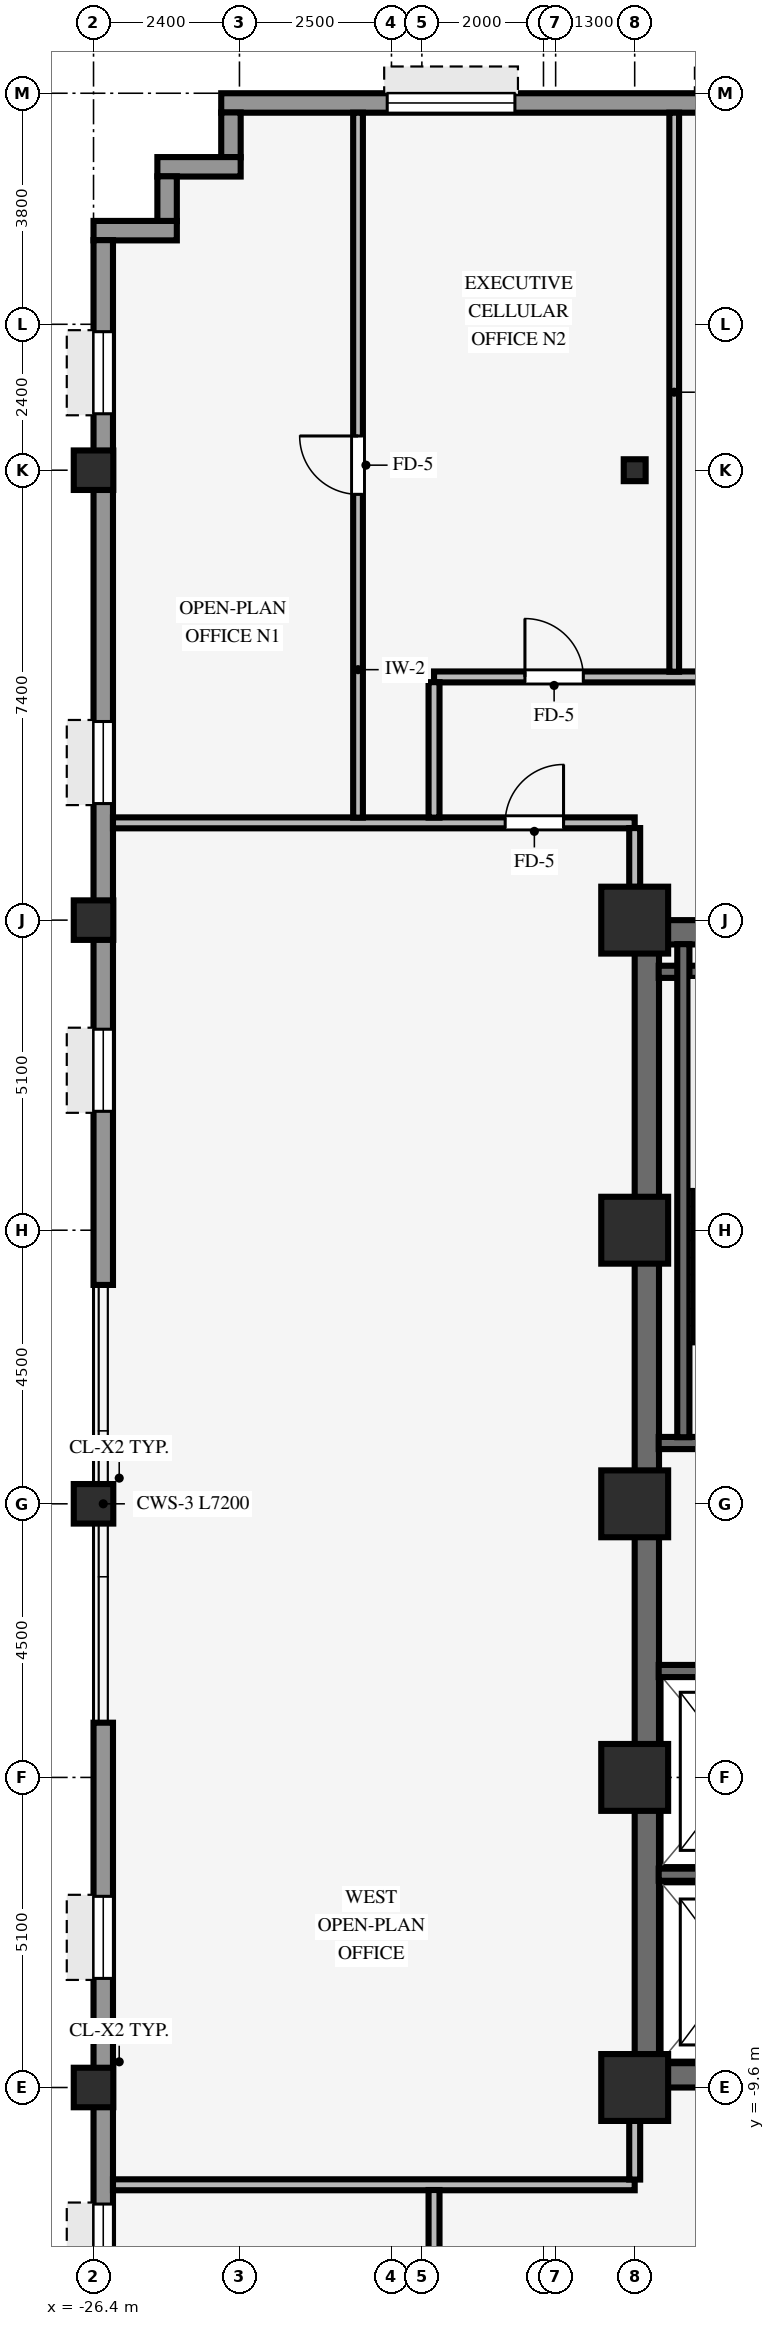
"""IFC4 building model, lengths in metres.
Left out: names, types, materials, properties, quantities, classifications, styles, units other than length and angle.
Written with IfcOpenShell. Run it as: python <this file> out.ifc"""

import sys

from ifc_helpers import new_model, si_unit, direction, frame, frame_2d, origin, origin_2d, place, context, subcontext, project, spatial, rectangle, hollow_rectangle, i_section, extrude, source, transform, mapped, element, fill, save


model = new_model("IFC4")
c1 = context("Model", 3, precision=1e-05, world=origin(), true_north=direction((0.0, 1.0)))
c2 = subcontext(c1, "Body", "Model", "MODEL_VIEW")
j1 = project(units=[si_unit("LENGTHUNIT", "METRE"), si_unit("PLANEANGLEUNIT", "RADIAN")], contexts=[c1])
p1 = place(None, origin())
s1 = spatial("IfcSite", under=j1, at=p1, CompositionType="ELEMENT")
p2 = place(p1, origin())
s2 = spatial("IfcBuilding", under=s1, at=p2, CompositionType="ELEMENT")
p3 = place(p2, frame((0.0, 0.0, 116.55)))
s3 = spatial("IfcBuildingStorey", under=s2, at=p3, CompositionType="ELEMENT", Elevation=116.55)
for number, where, z_axis, x_axis in (
    (1, (-17.5, -9.4, 0.0), (0.0, 0.0, 1.0), (1.0, 0.0, 0.0)),
    (2, (-17.5, 9.4, 0.0), (0.0, 0.0, 1.0), (1.0, 0.0, 0.0)),
):
    element("IfcWall", number, at=place(p3, frame(where, z_axis=z_axis, x_axis=x_axis)), inside=s3, PredefinedType="SHEAR", context=c2, shape_type="SweptSolid", body=[
        extrude(rectangle(XDim=8.5, YDim=0.4, at=frame_2d((4.25, 0.0))), origin(), (0.0, 0.0, 1.0), 3.37),
    ])
p4 = place(p3, frame((-17.3, -9.205, 0.0), z_axis=(0.0, 0.0, 1.0), x_axis=(0.0, 1.0, 0.0)))
e3 = element("IfcWall", 3, at=p4, inside=s3, PredefinedType="SHEAR", context=c2, shape_type="SweptSolid", body=[
    extrude(rectangle(XDim=18.41, YDim=0.4, at=frame_2d((9.205, 0.0))), origin(), (0.0, 0.0, 1.0), 3.37),
])
for number, where, z_axis, x_axis in (
    (4, (-17.5, -9.6, 0.0), (0.0, 0.0, 1.0), (1.0, 0.0, 0.0)),
    (5, (-17.5, -4.5, 0.0), (0.0, 0.0, 1.0), (1.0, 0.0, 0.0)),
    (6, (-17.5, 4.5, 0.0), (0.0, 0.0, 1.0), (1.0, 0.0, 0.0)),
    (7, (-17.5, 9.6, 0.0), (0.0, 0.0, 1.0), (1.0, 0.0, 0.0)),
    (8, (-17.5, 0.0, 0.0), (0.0, 0.0, 1.0), (1.0, 0.0, 0.0)),
):
    element("IfcColumn", number, at=place(p3, frame(where, z_axis=z_axis, x_axis=x_axis)), inside=s3, PredefinedType="COLUMN", context=c2, shape_type="SweptSolid", body=[
        extrude(rectangle(XDim=1.1, YDim=1.1, at=origin_2d()), origin(), (0.0, 0.0, 1.0), 3.37),
    ])
for number, where, z_axis, x_axis in (
    (9, (-26.4, -9.6, -0.4), (0.0, 0.0, 1.0), (1.0, 0.0, 0.0)),
    (10, (-26.4, 0.0, -0.4), (0.0, 0.0, 1.0), (1.0, 0.0, 0.0)),
    (11, (-26.4, 9.6, -0.4), (0.0, 0.0, 1.0), (1.0, 0.0, 0.0)),
    (12, (-26.4, 17.0, -0.4), (0.0, 0.0, 1.0), (1.0, 0.0, 0.0)),
):
    element("IfcColumn", number, at=place(p3, frame(where, z_axis=z_axis, x_axis=x_axis)), inside=s3, PredefinedType="COLUMN", context=c2, shape_type="SweptSolid", body=[
        extrude(hollow_rectangle(XDim=0.65, YDim=0.65, WallThickness=0.04, InnerFilletRadius=0.04, OuterFilletRadius=0.08, at=origin_2d()), origin(), (0.0, 0.0, 1.0), 3.77),
    ])
p5 = place(p3, frame((-17.5, 17.0, 0.0), z_axis=(0.0, 0.0, 1.0), x_axis=(1.0, 0.0, 0.0)))
e13 = element("IfcColumn", 13, at=p5, inside=s3, PredefinedType="COLUMN", context=c2, shape_type="SweptSolid", body=[
    extrude(i_section(OverallWidth=0.36, OverallDepth=0.36, WebThickness=0.021, FlangeThickness=0.021, FilletRadius=0.018, at=origin_2d()), origin(), (0.0, 0.0, 1.0), 3.37),
])
p6 = place(p3, frame((-24.3, 23.04, 0.0), z_axis=(0.0, 0.0, 1.0), x_axis=(1.0, 0.0, 0.0)))
e14 = element("IfcWall", 14, at=p6, inside=s3, PredefinedType="STANDARD", context=c2, shape_type="SweptSolid", body=[
    extrude(rectangle(XDim=48.6, YDim=0.32, at=frame_2d((24.3, 0.0))), origin(), (0.0, 0.0, 1.0), 2.705),
])
p7 = place(p6, frame((28.5, 0.0, 0.0)))
e15 = element("IfcOpeningElement", 15, at=p7, cuts=e14, PredefinedType="OPENING", context=c2, shape_type="SweptSolid", body=[
    extrude(rectangle(XDim=1.05, YDim=2.1, at=frame_2d((0.525, 1.05))), frame((0.0, 0.17, 0.0), z_axis=(0.0, -1.0, 0.0), x_axis=(1.0, 0.0, 0.0)), (0.0, 0.0, 1.0), 0.34),
])
p8 = place(p6, frame((2.73, 0.0, 0.8)))
e16 = element("IfcOpeningElement", 16, at=p8, cuts=e14, PredefinedType="OPENING", context=c2, shape_type="SweptSolid", body=[
    extrude(rectangle(XDim=2.1, YDim=1.56, at=frame_2d((1.05, 0.78))), frame((0.0, 0.17, 0.0), z_axis=(0.0, -1.0, 0.0), x_axis=(1.0, 0.0, 0.0)), (0.0, 0.0, 1.0), 0.34),
])
p9 = place(p6, frame((7.84, 0.0, 0.8)))
e17 = element("IfcOpeningElement", 17, at=p9, cuts=e14, PredefinedType="OPENING", context=c2, shape_type="SweptSolid", body=[
    extrude(rectangle(XDim=2.1, YDim=1.56, at=frame_2d((1.05, 0.78))), frame((0.0, 0.17, 0.0), z_axis=(0.0, -1.0, 0.0), x_axis=(1.0, 0.0, 0.0)), (0.0, 0.0, 1.0), 0.34),
])
p10 = place(p6, frame((20.92, 0.0, 0.8)))
e18 = element("IfcOpeningElement", 18, at=p10, cuts=e14, PredefinedType="OPENING", context=c2, shape_type="SweptSolid", body=[
    extrude(rectangle(XDim=2.1, YDim=1.56, at=frame_2d((1.05, 0.78))), frame((0.0, 0.17, 0.0), z_axis=(0.0, -1.0, 0.0), x_axis=(1.0, 0.0, 0.0)), (0.0, 0.0, 1.0), 0.34),
])
p11 = place(p6, frame((25.58, 0.0, 0.8)))
e19 = element("IfcOpeningElement", 19, at=p11, cuts=e14, PredefinedType="OPENING", context=c2, shape_type="SweptSolid", body=[
    extrude(rectangle(XDim=2.1, YDim=1.56, at=frame_2d((1.05, 0.78))), frame((0.0, 0.17, 0.0), z_axis=(0.0, -1.0, 0.0), x_axis=(1.0, 0.0, 0.0)), (0.0, 0.0, 1.0), 0.34),
])
p12 = place(p6, frame((30.24, 0.0, 0.8)))
e20 = element("IfcOpeningElement", 20, at=p12, cuts=e14, PredefinedType="OPENING", context=c2, shape_type="SweptSolid", body=[
    extrude(rectangle(XDim=2.1, YDim=1.56, at=frame_2d((1.05, 0.78))), frame((0.0, 0.17, 0.0), z_axis=(0.0, -1.0, 0.0), x_axis=(1.0, 0.0, 0.0)), (0.0, 0.0, 1.0), 0.34),
])
p13 = place(p6, frame((34.9, 0.0, 0.8)))
e21 = element("IfcOpeningElement", 21, at=p13, cuts=e14, PredefinedType="OPENING", context=c2, shape_type="SweptSolid", body=[
    extrude(rectangle(XDim=2.1, YDim=1.56, at=frame_2d((1.05, 0.78))), frame((0.0, 0.17, 0.0), z_axis=(0.0, -1.0, 0.0), x_axis=(1.0, 0.0, 0.0)), (0.0, 0.0, 1.0), 0.34),
])
p14 = place(p6, frame((39.56, 0.0, 0.8)))
e22 = element("IfcOpeningElement", 22, at=p14, cuts=e14, PredefinedType="OPENING", context=c2, shape_type="SweptSolid", body=[
    extrude(rectangle(XDim=2.1, YDim=1.56, at=frame_2d((1.05, 0.78))), frame((0.0, 0.17, 0.0), z_axis=(0.0, -1.0, 0.0), x_axis=(1.0, 0.0, 0.0)), (0.0, 0.0, 1.0), 0.34),
])
p15 = place(p6, frame((44.22, 0.0, 0.8)))
e23 = element("IfcOpeningElement", 23, at=p15, cuts=e14, PredefinedType="OPENING", context=c2, shape_type="SweptSolid", body=[
    extrude(rectangle(XDim=2.1, YDim=1.56, at=frame_2d((1.05, 0.78))), frame((0.0, 0.17, 0.0), z_axis=(0.0, -1.0, 0.0), x_axis=(1.0, 0.0, 0.0)), (0.0, 0.0, 1.0), 0.34),
])
p16 = place(p3, frame((-24.14, 22.146, 0.0), z_axis=(0.0, 0.0, 1.0), x_axis=(0.0, 1.0, 0.0)))
e24 = element("IfcWall", 24, at=p16, inside=s3, PredefinedType="STANDARD", context=c2, shape_type="SweptSolid", body=[
    extrude(rectangle(XDim=0.738, YDim=0.32, at=frame_2d((0.369, 0.0))), origin(), (0.0, 0.0, 1.0), 3.36),
])
p17 = place(p3, frame((-25.35, 21.99, 0.0), z_axis=(0.0, 0.0, 1.0), x_axis=(1.0, 0.0, 0.0)))
e25 = element("IfcWall", 25, at=p17, inside=s3, PredefinedType="STANDARD", context=c2, shape_type="SweptSolid", body=[
    extrude(rectangle(XDim=1.37, YDim=0.32, at=frame_2d((0.685, 0.0))), origin(), (0.0, 0.0, 1.0), 3.36),
])
p18 = place(p3, frame((-25.19, 21.096, 0.0), z_axis=(0.0, 0.0, 1.0), x_axis=(0.0, 1.0, 0.0)))
e26 = element("IfcWall", 26, at=p18, inside=s3, PredefinedType="STANDARD", context=c2, shape_type="SweptSolid", body=[
    extrude(rectangle(XDim=0.738, YDim=0.32, at=frame_2d((0.369, 0.0))), origin(), (0.0, 0.0, 1.0), 3.36),
])
p19 = place(p3, frame((-26.4, 20.94, 0.0), z_axis=(0.0, 0.0, 1.0), x_axis=(1.0, 0.0, 0.0)))
e27 = element("IfcWall", 27, at=p19, inside=s3, PredefinedType="STANDARD", context=c2, shape_type="SweptSolid", body=[
    extrude(rectangle(XDim=1.37, YDim=0.32, at=frame_2d((0.685, 0.0))), origin(), (0.0, 0.0, 1.0), 3.36),
])
p20 = place(p3, frame((-26.24, -20.784, 0.0), z_axis=(0.0, 0.0, 1.0), x_axis=(0.0, 1.0, 0.0)))
e28 = element("IfcWall", 28, at=p20, inside=s3, PredefinedType="STANDARD", context=c2, shape_type="SweptSolid", body=[
    extrude(rectangle(XDim=17.184, YDim=0.32, at=frame_2d((8.592, 0.0))), origin(), (0.0, 0.0, 1.0), 2.705),
])
p21 = place(p20, frame((1.506, 0.0, 0.8)))
e29 = element("IfcOpeningElement", 29, at=p21, cuts=e28, PredefinedType="OPENING", context=c2, shape_type="SweptSolid", body=[
    extrude(rectangle(XDim=1.35, YDim=1.56, at=frame_2d((0.675, 0.78))), frame((0.0, 0.17, 0.0), z_axis=(0.0, -1.0, 0.0), x_axis=(1.0, 0.0, 0.0)), (0.0, 0.0, 1.0), 0.34),
])
p22 = place(p20, frame((7.917, 0.0, 0.8)))
e30 = element("IfcOpeningElement", 30, at=p22, cuts=e28, PredefinedType="OPENING", context=c2, shape_type="SweptSolid", body=[
    extrude(rectangle(XDim=1.35, YDim=1.56, at=frame_2d((0.675, 0.78))), frame((0.0, 0.17, 0.0), z_axis=(0.0, -1.0, 0.0), x_axis=(1.0, 0.0, 0.0)), (0.0, 0.0, 1.0), 0.34),
])
p23 = place(p20, frame((12.978, 0.0, 0.8)))
e31 = element("IfcOpeningElement", 31, at=p23, cuts=e28, PredefinedType="OPENING", context=c2, shape_type="SweptSolid", body=[
    extrude(rectangle(XDim=1.35, YDim=1.56, at=frame_2d((0.675, 0.78))), frame((0.0, 0.17, 0.0), z_axis=(0.0, -1.0, 0.0), x_axis=(1.0, 0.0, 0.0)), (0.0, 0.0, 1.0), 0.34),
])
p24 = place(p3, frame((-26.24, 3.6, 0.0), z_axis=(0.0, 0.0, 1.0), x_axis=(0.0, 1.0, 0.0)))
e32 = element("IfcWall", 32, at=p24, inside=s3, PredefinedType="STANDARD", context=c2, shape_type="SweptSolid", body=[
    extrude(rectangle(XDim=17.184, YDim=0.32, at=frame_2d((8.592, 0.0))), origin(), (0.0, 0.0, 1.0), 2.705),
])
p25 = place(p24, frame((2.856, 0.0, 0.8)))
e33 = element("IfcOpeningElement", 33, at=p25, cuts=e32, PredefinedType="OPENING", context=c2, shape_type="SweptSolid", body=[
    extrude(rectangle(XDim=1.35, YDim=1.56, at=frame_2d((0.675, 0.78))), frame((0.0, 0.17, 0.0), z_axis=(0.0, -1.0, 0.0), x_axis=(1.0, 0.0, 0.0)), (0.0, 0.0, 1.0), 0.34),
])
p26 = place(p24, frame((7.917, 0.0, 0.8)))
e34 = element("IfcOpeningElement", 34, at=p26, cuts=e32, PredefinedType="OPENING", context=c2, shape_type="SweptSolid", body=[
    extrude(rectangle(XDim=1.35, YDim=1.56, at=frame_2d((0.675, 0.78))), frame((0.0, 0.17, 0.0), z_axis=(0.0, -1.0, 0.0), x_axis=(1.0, 0.0, 0.0)), (0.0, 0.0, 1.0), 0.34),
])
p27 = place(p24, frame((14.328, 0.0, 0.8)))
e35 = element("IfcOpeningElement", 35, at=p27, cuts=e32, PredefinedType="OPENING", context=c2, shape_type="SweptSolid", body=[
    extrude(rectangle(XDim=1.35, YDim=1.56, at=frame_2d((0.675, 0.78))), frame((0.0, 0.17, 0.0), z_axis=(0.0, -1.0, 0.0), x_axis=(1.0, 0.0, 0.0)), (0.0, 0.0, 1.0), 0.34),
])
for number, where, z_axis, x_axis in (
    (36, (-17.105, 1.0, 0.0), (0.0, 0.0, 1.0), (1.0, 0.0, 0.0)),
    (37, (-17.105, 8.75, 0.0), (0.0, 0.0, 1.0), (1.0, 0.0, 0.0)),
):
    element("IfcWall", number, at=place(p3, frame(where, z_axis=z_axis, x_axis=x_axis)), inside=s3, PredefinedType="SHEAR", context=c2, shape_type="SweptSolid", body=[
        extrude(rectangle(XDim=3.57, YDim=0.2, at=frame_2d((1.785, 0.0))), origin(), (0.0, 0.0, 1.0), 3.37),
    ])
p28 = place(p3, frame((-16.7, 1.095, 0.0), z_axis=(0.0, 0.0, 1.0), x_axis=(0.0, 1.0, 0.0)))
e38 = element("IfcWall", 38, at=p28, inside=s3, PredefinedType="SHEAR", context=c2, shape_type="SweptSolid", body=[
    extrude(rectangle(XDim=8.11, YDim=0.2, at=frame_2d((4.055, 0.0))), origin(), (0.0, 0.0, 1.0), 3.37),
])
p29 = place(p3, frame((-17.105, -6.1, 0.0), z_axis=(0.0, 0.0, 1.0), x_axis=(1.0, 0.0, 0.0)))
e39 = element("IfcWall", 39, at=p29, inside=s3, PredefinedType="SHEAR", context=c2, shape_type="SweptSolid", body=[
    extrude(rectangle(XDim=2.855, YDim=0.2, at=frame_2d((1.427, 0.0))), origin(), (0.0, 0.0, 1.0), 3.37),
])
p30 = place(p3, frame((-17.105, -2.75, 0.0), z_axis=(0.0, 0.0, 1.0), x_axis=(1.0, 0.0, 0.0)))
e40 = element("IfcWall", 40, at=p30, inside=s3, PredefinedType="SHEAR", context=c2, shape_type="SweptSolid", body=[
    extrude(rectangle(XDim=2.66, YDim=0.2, at=frame_2d((1.33, 0.0))), origin(), (0.0, 0.0, 1.0), 3.37),
])
p31 = place(p3, frame((-26.08, -11.2, 0.0), z_axis=(0.0, 0.0, 1.0), x_axis=(1.0, 0.0, 0.0)))
e41 = element("IfcWall", 41, at=p31, inside=s3, PredefinedType="PARTITIONING", context=c2, shape_type="SweptSolid", body=[
    extrude(rectangle(XDim=8.58, YDim=0.18, at=frame_2d((4.29, 0.0))), origin(), (0.0, 0.0, 1.0), 3.36),
])
p32 = place(p3, frame((-26.08, 11.2, 0.0), z_axis=(0.0, 0.0, 1.0), x_axis=(1.0, 0.0, 0.0)))
e42 = element("IfcWall", 42, at=p32, inside=s3, PredefinedType="PARTITIONING", context=c2, shape_type="SweptSolid", body=[
    extrude(rectangle(XDim=8.58, YDim=0.18, at=frame_2d((4.29, 0.0))), origin(), (0.0, 0.0, 1.0), 3.36),
])
p33 = place(p32, frame((6.45, 0.0, 0.0)))
e43 = element("IfcOpeningElement", 43, at=p33, cuts=e42, PredefinedType="OPENING", context=c2, shape_type="SweptSolid", body=[
    extrude(rectangle(XDim=0.96, YDim=2.1, at=frame_2d((0.48, 1.05))), frame((0.0, 0.1, 0.0), z_axis=(0.0, -1.0, 0.0), x_axis=(1.0, 0.0, 0.0)), (0.0, 0.0, 1.0), 0.2),
])
p34 = place(p3, frame((-20.8, 13.6, 0.0), z_axis=(0.0, 0.0, 1.0), x_axis=(1.0, 0.0, 0.0)))
e44 = element("IfcWall", 44, at=p34, inside=s3, PredefinedType="PARTITIONING", context=c2, shape_type="SweptSolid", body=[
    extrude(rectangle(XDim=5.8, YDim=0.18, at=frame_2d((2.9, 0.0))), origin(), (0.0, 0.0, 1.0), 2.998),
])
p35 = place(p34, frame((1.495, 0.0, 0.0)))
e45 = element("IfcOpeningElement", 45, at=p35, cuts=e44, PredefinedType="OPENING", context=c2, shape_type="SweptSolid", body=[
    extrude(rectangle(XDim=0.96, YDim=2.1, at=frame_2d((0.48, 1.05))), frame((0.0, 0.1, 0.0), z_axis=(0.0, -1.0, 0.0), x_axis=(1.0, 0.0, 0.0)), (0.0, 0.0, 1.0), 0.2),
])
p36 = place(p3, frame((-22.05, 11.286, 0.0), z_axis=(0.0, 0.0, 1.0), x_axis=(0.0, 1.0, 0.0)))
e46 = element("IfcWall", 46, at=p36, inside=s3, PredefinedType="PARTITIONING", context=c2, shape_type="SweptSolid", body=[
    extrude(rectangle(XDim=11.594, YDim=0.16, at=frame_2d((5.797, 0.0))), origin(), (0.0, 0.0, 1.0), 3.36),
])
p37 = place(p36, frame((5.317, 0.0, 0.0)))
e47 = element("IfcOpeningElement", 47, at=p37, cuts=e46, PredefinedType="OPENING", context=c2, shape_type="SweptSolid", body=[
    extrude(rectangle(XDim=0.96, YDim=2.1, at=frame_2d((0.48, 1.05))), frame((0.0, 0.09, 0.0), z_axis=(0.0, -1.0, 0.0), x_axis=(1.0, 0.0, 0.0)), (0.0, 0.0, 1.0), 0.18),
])
for number, where, z_axis, x_axis in (
    (48, (-20.8, -13.514, 0.0), (0.0, 0.0, 1.0), (0.0, 1.0, 0.0)),
    (49, (-20.8, 11.286, 0.0), (0.0, 0.0, 1.0), (0.0, 1.0, 0.0)),
):
    element("IfcWall", number, at=place(p3, frame(where, z_axis=z_axis, x_axis=x_axis)), inside=s3, PredefinedType="PARTITIONING", context=c2, shape_type="SweptSolid", body=[
        extrude(rectangle(XDim=2.228, YDim=0.18, at=frame_2d((1.114, 0.0))), origin(), (0.0, 0.0, 1.0), 3.36),
    ])
for number, where, z_axis, x_axis in (
    (50, (-17.5, -11.114, 0.0), (0.0, 0.0, 1.0), (0.0, 1.0, 0.0)),
    (51, (-17.5, 10.146, 0.0), (0.0, 0.0, 1.0), (0.0, 1.0, 0.0)),
):
    element("IfcWall", number, at=place(p3, frame(where, z_axis=z_axis, x_axis=x_axis)), inside=s3, PredefinedType="PARTITIONING", context=c2, shape_type="SweptSolid", body=[
        extrude(rectangle(XDim=0.968, YDim=0.18, at=frame_2d((0.484, 0.0))), origin(), (0.0, 0.0, 1.0), 2.738),
    ])
p38 = place(p3, frame((-16.85, 13.686, 0.0), z_axis=(0.0, 0.0, 1.0), x_axis=(0.0, 1.0, 0.0)))
e52 = element("IfcWall", 52, at=p38, inside=s3, PredefinedType="PARTITIONING", context=c2, shape_type="SweptSolid", body=[
    extrude(rectangle(XDim=9.194, YDim=0.16, at=frame_2d((4.597, 0.0))), origin(), (0.0, 0.0, 1.0), 3.36),
])
m1 = source(origin(), c2, "Body", "SweptSolid", [
    extrude(rectangle(XDim=2.1, YDim=1.56, at=frame_2d((1.05, 0.78))), frame((0.0, 0.03, 0.0), z_axis=(0.0, -1.0, 0.0), x_axis=(1.0, 0.0, 0.0)), (0.0, 0.0, 1.0), 0.06),
])
p39 = place(p8, origin())
e53 = element("IfcWindow", 53, at=p39, inside=s3, PartitioningType="SINGLE_PANEL", PredefinedType="WINDOW", context=c2, shape_type="MappedRepresentation", body=[
    mapped(m1, transform((0.0, 0.0, 0.0), scale=1.0)),
])
fill(e16, e53)
m2 = source(origin(), c2, "Body", "SweptSolid", [
    extrude(rectangle(XDim=1.35, YDim=1.56, at=frame_2d((0.675, 0.78))), frame((0.0, 0.03, 0.0), z_axis=(0.0, -1.0, 0.0), x_axis=(1.0, 0.0, 0.0)), (0.0, 0.0, 1.0), 0.06),
])
p40 = place(p22, origin())
e54 = element("IfcWindow", 54, at=p40, inside=s3, PartitioningType="SINGLE_PANEL", PredefinedType="WINDOW", context=c2, shape_type="MappedRepresentation", body=[
    mapped(m2, transform((0.0, 0.0, 0.0), scale=1.0)),
])
fill(e30, e54)
p41 = place(p23, origin())
e55 = element("IfcWindow", 55, at=p41, inside=s3, PartitioningType="SINGLE_PANEL", PredefinedType="WINDOW", context=c2, shape_type="MappedRepresentation", body=[
    mapped(m2, transform((0.0, 0.0, 0.0), scale=1.0)),
])
fill(e31, e55)
p42 = place(p25, origin())
e56 = element("IfcWindow", 56, at=p42, inside=s3, PartitioningType="SINGLE_PANEL", PredefinedType="WINDOW", context=c2, shape_type="MappedRepresentation", body=[
    mapped(m2, transform((0.0, 0.0, 0.0), scale=1.0)),
])
fill(e33, e56)
p43 = place(p26, origin())
e57 = element("IfcWindow", 57, at=p43, inside=s3, PartitioningType="SINGLE_PANEL", PredefinedType="WINDOW", context=c2, shape_type="MappedRepresentation", body=[
    mapped(m2, transform((0.0, 0.0, 0.0), scale=1.0)),
])
fill(e34, e57)
p44 = place(p27, origin())
e58 = element("IfcWindow", 58, at=p44, inside=s3, PartitioningType="SINGLE_PANEL", PredefinedType="WINDOW", context=c2, shape_type="MappedRepresentation", body=[
    mapped(m2, transform((0.0, 0.0, 0.0), scale=1.0)),
])
fill(e35, e58)
m3 = source(origin(), c2, "Body", "SweptSolid", [
    extrude(rectangle(XDim=0.96, YDim=2.1, at=frame_2d((0.48, 1.05))), frame((0.0, 0.025, 0.0), z_axis=(0.0, -1.0, 0.0), x_axis=(1.0, 0.0, 0.0)), (0.0, 0.0, 1.0), 0.05),
])
p45 = place(p35, origin())
e59 = element("IfcDoor", 59, at=p45, inside=s3, OperationType="SINGLE_SWING_LEFT", PredefinedType="DOOR", context=c2, shape_type="MappedRepresentation", body=[
    mapped(m3, transform((0.0, 0.0, 0.0), scale=1.0)),
])
fill(e45, e59)
p46 = place(p33, origin())
e60 = element("IfcDoor", 60, at=p46, inside=s3, OperationType="SINGLE_SWING_RIGHT", PredefinedType="DOOR", context=c2, shape_type="MappedRepresentation", body=[
    mapped(m3, transform((0.0, 0.0, 0.0), scale=1.0)),
])
fill(e43, e60)
p47 = place(p37, origin())
e61 = element("IfcDoor", 61, at=p47, inside=s3, OperationType="SINGLE_SWING_RIGHT", PredefinedType="DOOR", context=c2, shape_type="MappedRepresentation", body=[
    mapped(m3, transform((0.0, 0.0, 0.0), scale=1.0)),
])
fill(e47, e61)
save(model, sys.argv[1])
